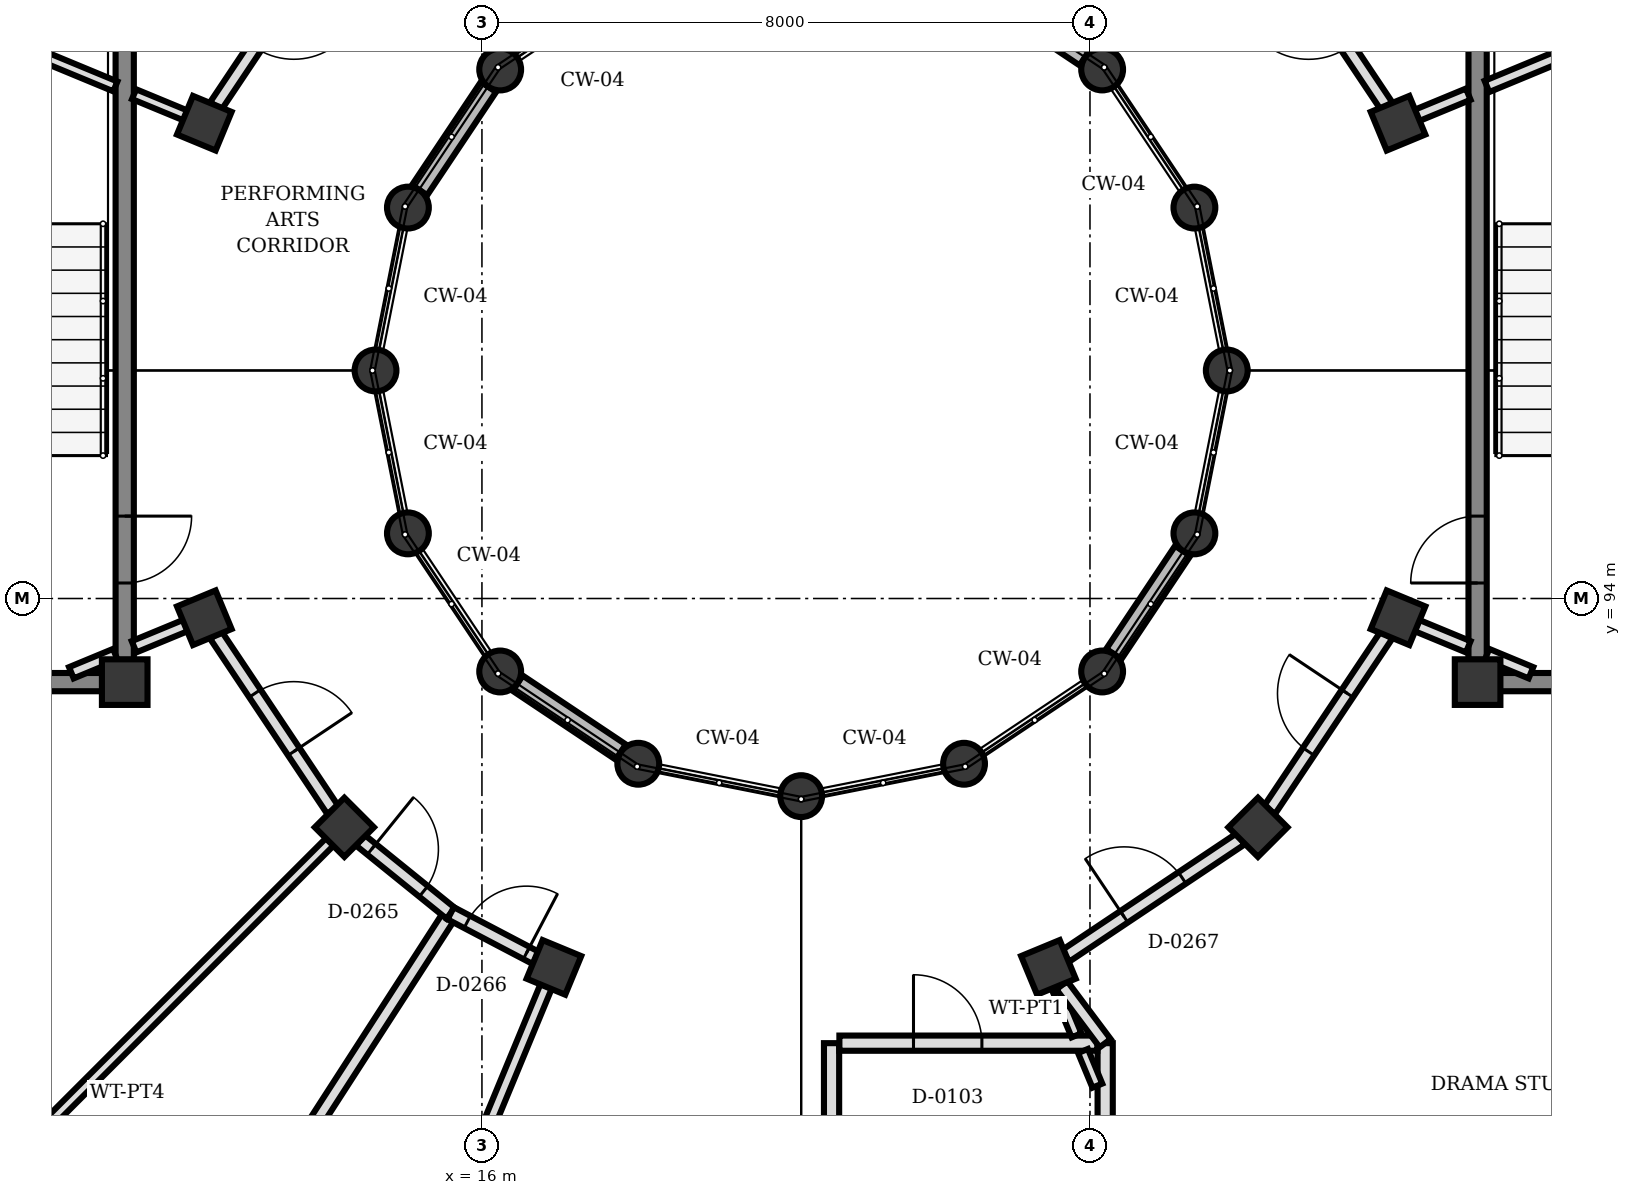
"""IFC4 building model, lengths in metres.
Left out: names, types, materials, properties, quantities, classifications, styles, units other than length and angle.
Written with IfcOpenShell. Run it as: python <this file> out.ifc"""

import sys

from ifc_helpers import new_model, si_unit, direction, frame, frame_2d, origin, origin_2d, place, context, subcontext, project, spatial, rectangle, circle, extrude, element, fill, save


model = new_model("IFC4")
c1 = context("Model", 3, precision=1e-05, world=origin(), true_north=direction((0.0, 1.0)))
c2 = subcontext(c1, "Body", "Model", "MODEL_VIEW")
j1 = project(units=[si_unit("LENGTHUNIT", "METRE"), si_unit("PLANEANGLEUNIT", "RADIAN")], contexts=[c1])
p1 = place(None, origin())
s1 = spatial("IfcSite", under=j1, at=p1, CompositionType="ELEMENT")
p2 = place(p1, origin())
s2 = spatial("IfcBuilding", under=s1, at=p2, CompositionType="ELEMENT")
p3 = place(p2, frame((0.0, 0.0, 8.5)))
s3 = spatial("IfcBuildingStorey", under=s2, at=p3, CompositionType="ELEMENT", Elevation=8.5)
for number, where, z_axis, x_axis in (
    (1, (11.3, 92.9, 0.0), (0.0, 0.0, 1.0), (1.0, 0.0, 0.0)),
    (2, (29.1, 92.9, 0.0), (0.0, 0.0, 1.0), (1.0, 0.0, 0.0)),
):
    element("IfcColumn", number, at=place(p3, frame(where, z_axis=z_axis, x_axis=x_axis)), inside=s3, PredefinedType="COLUMN", context=c2, shape_type="SweptSolid", body=[
        extrude(rectangle(XDim=0.6, YDim=0.6, at=origin_2d()), origin(), (0.0, 0.0, 1.0), 4.0),
    ])
for number, where, z_axis, x_axis in (
    (3, (25.8, 97.0, 0.0), (0.0, 0.0, 1.0), (1.0, 0.0, 0.0)),
    (4, (25.374, 99.143, 0.0), (0.0, 0.0, 1.0), (1.0, 0.0, 0.0)),
    (5, (24.16, 100.96, 0.0), (0.0, 0.0, 1.0), (1.0, 0.0, 0.0)),
    (6, (16.24, 100.96, 0.0), (0.0, 0.0, 1.0), (1.0, 0.0, 0.0)),
    (7, (15.026, 99.143, 0.0), (0.0, 0.0, 1.0), (1.0, 0.0, 0.0)),
    (8, (14.6, 97.0, 0.0), (0.0, 0.0, 1.0), (1.0, 0.0, 0.0)),
    (9, (15.026, 94.857, 0.0), (0.0, 0.0, 1.0), (1.0, 0.0, 0.0)),
    (10, (16.24, 93.04, 0.0), (0.0, 0.0, 1.0), (1.0, 0.0, 0.0)),
    (11, (18.057, 91.826, 0.0), (0.0, 0.0, 1.0), (1.0, 0.0, 0.0)),
    (12, (20.2, 91.4, 0.0), (0.0, 0.0, 1.0), (1.0, 0.0, 0.0)),
    (13, (22.343, 91.826, 0.0), (0.0, 0.0, 1.0), (1.0, 0.0, 0.0)),
    (14, (24.16, 93.04, 0.0), (0.0, 0.0, 1.0), (1.0, 0.0, 0.0)),
    (15, (25.374, 94.857, 0.0), (0.0, 0.0, 1.0), (1.0, 0.0, 0.0)),
):
    element("IfcColumn", number, at=place(p3, frame(where, z_axis=z_axis, x_axis=x_axis)), inside=s3, PredefinedType="COLUMN", context=c2, shape_type="SweptSolid", body=[
        extrude(circle(Radius=0.275, at=origin_2d()), origin(), (0.0, 0.0, 1.0), 4.0),
    ])
for number, where, z_axis, x_axis in (
    (16, (28.053, 100.253, 0.0), (0.0, 0.0, 1.0), (0.924, 0.383, 0.0)),
    (17, (12.347, 100.253, 0.0), (0.0, 0.0, 1.0), (-0.924, 0.383, 0.0)),
    (18, (12.347, 93.747, 0.0), (0.0, 0.0, 1.0), (-0.924, -0.383, 0.0)),
    (19, (14.19, 90.99, 0.0), (0.0, 0.0, 1.0), (-0.707, -0.707, 0.0)),
    (20, (16.947, 89.147, 0.0), (0.0, 0.0, 1.0), (-0.383, -0.924, 0.0)),
    (21, (23.453, 89.147, 0.0), (0.0, 0.0, 1.0), (0.383, -0.924, 0.0)),
    (22, (26.21, 90.99, 0.0), (0.0, 0.0, 1.0), (0.707, -0.707, 0.0)),
    (23, (28.053, 93.747, 0.0), (0.0, 0.0, 1.0), (0.924, -0.383, 0.0)),
):
    element("IfcColumn", number, at=place(p3, frame(where, z_axis=z_axis, x_axis=x_axis)), inside=s3, PredefinedType="COLUMN", context=c2, shape_type="SweptSolid", body=[
        extrude(rectangle(XDim=0.55, YDim=0.55, at=origin_2d()), origin(), (0.0, 0.0, 1.0), 4.0),
    ])
for number, where, z_axis, x_axis in (
    (24, (23.93, 101.114, 0.0), (0.0, 0.0, 1.0), (-0.832, 0.555, 0.0)),
    (25, (16.086, 100.73, 0.0), (0.0, 0.0, 1.0), (-0.555, -0.832, 0.0)),
    (26, (16.47, 92.886, 0.0), (0.0, 0.0, 1.0), (0.832, -0.555, 0.0)),
    (27, (24.314, 93.27, 0.0), (0.0, 0.0, 1.0), (0.555, 0.832, 0.0)),
):
    element("IfcWall", number, at=place(p3, frame(where, z_axis=z_axis, x_axis=x_axis)), inside=s3, PredefinedType="SOLIDWALL", context=c2, shape_type="SweptSolid", body=[
        extrude(rectangle(XDim=1.632, YDim=0.24, at=frame_2d((0.816, 0.0))), origin(), (0.0, 0.0, 1.0), 3.222),
    ])
p4 = place(p3, frame((11.3, 101.328, 0.0), z_axis=(0.0, 0.0, 1.0), x_axis=(0.0, -1.0, 0.0)))
e28 = element("IfcWall", 28, at=p4, inside=s3, PredefinedType="SHEAR", context=c2, shape_type="SweptSolid", body=[
    extrude(rectangle(XDim=8.136, YDim=0.24, at=frame_2d((4.068, 0.0))), origin(), (0.0, 0.0, 1.0), 3.74),
])
p5 = place(p4, frame((6.244, 0.0, 0.0)))
e29 = element("IfcOpeningElement", 29, at=p5, cuts=e28, PredefinedType="OPENING", context=c2, shape_type="SweptSolid", body=[
    extrude(rectangle(XDim=0.88, YDim=2.1, at=frame_2d((0.44, 1.05))), frame((0.0, 0.13, 0.0), z_axis=(0.0, -1.0, 0.0), x_axis=(1.0, 0.0, 0.0)), (0.0, 0.0, 1.0), 0.26),
])
p6 = place(p3, frame((11.008, 92.9, 0.0), z_axis=(0.0, 0.0, 1.0), x_axis=(-1.0, 0.0, 0.0)))
e30 = element("IfcWall", 30, at=p6, inside=s3, PredefinedType="SHEAR", context=c2, shape_type="SweptSolid", body=[
    extrude(rectangle(XDim=4.216, YDim=0.24, at=frame_2d((2.108, 0.0))), origin(), (0.0, 0.0, 1.0), 3.74),
])
p7 = place(p3, frame((29.1, 93.192, 0.0), z_axis=(0.0, 0.0, 1.0), x_axis=(0.0, 1.0, 0.0)))
e31 = element("IfcWall", 31, at=p7, inside=s3, PredefinedType="SHEAR", context=c2, shape_type="SweptSolid", body=[
    extrude(rectangle(XDim=8.136, YDim=0.24, at=frame_2d((4.068, 0.0))), origin(), (0.0, 0.0, 1.0), 3.74),
])
p8 = place(p7, frame((1.012, 0.0, 0.0)))
e32 = element("IfcOpeningElement", 32, at=p8, cuts=e31, PredefinedType="OPENING", context=c2, shape_type="SweptSolid", body=[
    extrude(rectangle(XDim=0.88, YDim=2.1, at=frame_2d((0.44, 1.05))), frame((0.0, 0.13, 0.0), z_axis=(0.0, -1.0, 0.0), x_axis=(1.0, 0.0, 0.0)), (0.0, 0.0, 1.0), 0.26),
])
p9 = place(p3, frame((33.608, 92.9, 0.0), z_axis=(0.0, 0.0, 1.0), x_axis=(-1.0, 0.0, 0.0)))
e33 = element("IfcWall", 33, at=p9, inside=s3, PredefinedType="SHEAR", context=c2, shape_type="SweptSolid", body=[
    extrude(rectangle(XDim=4.216, YDim=0.24, at=frame_2d((2.108, 0.0))), origin(), (0.0, 0.0, 1.0), 3.74),
])
p10 = place(p3, frame((20.6, 84.867, 0.0), z_axis=(0.0, 0.0, 1.0), x_axis=(0.0, 1.0, 0.0)))
e34 = element("IfcWall", 34, at=p10, inside=s3, PredefinedType="PARTITIONING", context=c2, shape_type="SweptSolid", body=[
    extrude(rectangle(XDim=3.283, YDim=0.2, at=frame_2d((1.642, 0.0))), origin(), (0.0, 0.0, 1.0), 3.7),
])
p11 = place(p3, frame((24.2, 84.703, 0.0), z_axis=(0.0, 0.0, 1.0), x_axis=(0.0, 1.0, 0.0)))
e35 = element("IfcWall", 35, at=p11, inside=s3, PredefinedType="PARTITIONING", context=c2, shape_type="SweptSolid", body=[
    extrude(rectangle(XDim=3.447, YDim=0.2, at=frame_2d((1.724, 0.0))), origin(), (0.0, 0.0, 1.0), 3.072),
])
p12 = place(p3, frame((20.703, 88.15, 0.0), z_axis=(0.0, 0.0, 1.0), x_axis=(1.0, 0.0, 0.0)))
e36 = element("IfcWall", 36, at=p12, inside=s3, PredefinedType="PARTITIONING", context=c2, shape_type="SweptSolid", body=[
    extrude(rectangle(XDim=3.394, YDim=0.2, at=frame_2d((1.697, 0.0))), origin(), (0.0, 0.0, 1.0), 3.072),
])
p13 = place(p12, frame((0.975, 0.0, 0.0)))
e37 = element("IfcOpeningElement", 37, at=p13, cuts=e36, PredefinedType="OPENING", context=c2, shape_type="SweptSolid", body=[
    extrude(rectangle(XDim=0.9, YDim=2.2, at=frame_2d((0.45, 1.1))), frame((0.0, 0.11, 0.0), z_axis=(0.0, -1.0, 0.0), x_axis=(1.0, 0.0, 0.0)), (0.0, 0.0, 1.0), 0.22),
])
p14 = place(p3, frame((28.3, 100.355, 0.0), z_axis=(0.0, 0.0, 1.0), x_axis=(0.924069600435, 0.382224245113, 0.0)))
e38 = element("IfcWall", 38, at=p14, inside=s3, PredefinedType="PARTITIONING", context=c2, shape_type="SweptSolid", body=[
    extrude(rectangle(XDim=0.733, YDim=0.16, at=frame_2d((0.366, 0.0))), origin(), (0.0, 0.0, 1.0), 3.7),
])
p15 = place(p3, frame((29.223, 100.737, 0.0), z_axis=(0.0, 0.0, 1.0), x_axis=(0.923817443679, 0.382833293686, 0.0)))
e39 = element("IfcWall", 39, at=p15, inside=s3, PredefinedType="PARTITIONING", context=c2, shape_type="SweptSolid", body=[
    extrude(rectangle(XDim=1.985, YDim=0.16, at=frame_2d((0.993, 0.0))), origin(), (0.0, 0.0, 1.0), 3.7),
])
p16 = place(p3, frame((12.1, 100.355, 0.0), z_axis=(0.0, 0.0, 1.0), x_axis=(-0.924069600435, 0.382224245113, 0.0)))
e40 = element("IfcWall", 40, at=p16, inside=s3, PredefinedType="PARTITIONING", context=c2, shape_type="SweptSolid", body=[
    extrude(rectangle(XDim=0.733, YDim=0.14, at=frame_2d((0.366, 0.0))), origin(), (0.0, 0.0, 1.0), 3.7),
])
p17 = place(p3, frame((11.177, 100.737, 0.0), z_axis=(0.0, 0.0, 1.0), x_axis=(-0.923817443679, 0.382833293686, 0.0)))
e41 = element("IfcWall", 41, at=p17, inside=s3, PredefinedType="PARTITIONING", context=c2, shape_type="SweptSolid", body=[
    extrude(rectangle(XDim=1.985, YDim=0.14, at=frame_2d((0.993, 0.0))), origin(), (0.0, 0.0, 1.0), 3.7),
])
p18 = place(p3, frame((12.1, 93.645, 0.0), z_axis=(0.0, 0.0, 1.0), x_axis=(-0.924069600435, -0.382224245113, 0.0)))
e42 = element("IfcWall", 42, at=p18, inside=s3, PredefinedType="PARTITIONING", context=c2, shape_type="SweptSolid", body=[
    extrude(rectangle(XDim=0.733, YDim=0.16, at=frame_2d((0.366, 0.0))), origin(), (0.0, 0.0, 1.0), 3.072),
])
p19 = place(p3, frame((11.177, 93.263, 0.0), z_axis=(0.0, 0.0, 1.0), x_axis=(-0.923812676193, -0.382844797933, 0.0)))
e43 = element("IfcWall", 43, at=p19, inside=s3, PredefinedType="PARTITIONING", context=c2, shape_type="SweptSolid", body=[
    extrude(rectangle(XDim=0.627, YDim=0.16, at=frame_2d((0.313, 0.0))), origin(), (0.0, 0.0, 1.0), 3.072),
])
p20 = place(p3, frame((14.001, 90.801, 0.0), z_axis=(0.0, 0.0, 1.0), x_axis=(-0.707106781187, -0.707106781187, 0.0)))
e44 = element("IfcWall", 44, at=p20, inside=s3, PredefinedType="PARTITIONING", context=c2, shape_type="SweptSolid", body=[
    extrude(rectangle(XDim=8.441, YDim=0.14, at=frame_2d((4.221, 0.0))), origin(), (0.0, 0.0, 1.0), 3.072),
])
p21 = place(p3, frame((16.845, 88.9, 0.0), z_axis=(0.0, 0.0, 1.0), x_axis=(-0.382683896966, -0.923879340067, 0.0)))
e45 = element("IfcWall", 45, at=p21, inside=s3, PredefinedType="PARTITIONING", context=c2, shape_type="SweptSolid", body=[
    extrude(rectangle(XDim=8.44, YDim=0.16, at=frame_2d((4.22, 0.0))), origin(), (0.0, 0.0, 1.0), 3.072),
])
p22 = place(p3, frame((23.555, 88.9, 0.0), z_axis=(0.0, 0.0, 1.0), x_axis=(0.38278283439, -0.923838352579, 0.0)))
e46 = element("IfcWall", 46, at=p22, inside=s3, PredefinedType="PARTITIONING", context=c2, shape_type="SweptSolid", body=[
    extrude(rectangle(XDim=0.7, YDim=0.14, at=frame_2d((0.35, 0.0))), origin(), (0.0, 0.0, 1.0), 3.072),
])
p23 = place(p3, frame((23.908, 88.047, 0.0), z_axis=(0.0, 0.0, 1.0), x_axis=(0.3827885685, -0.92383597669, 0.0)))
e47 = element("IfcWall", 47, at=p23, inside=s3, PredefinedType="PARTITIONING", context=c2, shape_type="SweptSolid", body=[
    extrude(rectangle(XDim=0.494, YDim=0.14, at=frame_2d((0.247, 0.0))), origin(), (0.0, 0.0, 1.0), 3.072),
])
p24 = place(p3, frame((28.3, 93.645, 0.0), z_axis=(0.0, 0.0, 1.0), x_axis=(0.924069600435, -0.382224245113, 0.0)))
e48 = element("IfcWall", 48, at=p24, inside=s3, PredefinedType="PARTITIONING", context=c2, shape_type="SweptSolid", body=[
    extrude(rectangle(XDim=0.733, YDim=0.16, at=frame_2d((0.366, 0.0))), origin(), (0.0, 0.0, 1.0), 3.072),
])
p25 = place(p3, frame((29.223, 93.263, 0.0), z_axis=(0.0, 0.0, 1.0), x_axis=(0.923812676193, -0.382844797933, 0.0)))
e49 = element("IfcWall", 49, at=p25, inside=s3, PredefinedType="PARTITIONING", context=c2, shape_type="SweptSolid", body=[
    extrude(rectangle(XDim=0.627, YDim=0.16, at=frame_2d((0.313, 0.0))), origin(), (0.0, 0.0, 1.0), 3.072),
])
p26 = place(p3, frame((15.589, 89.859, 0.0), z_axis=(0.0, 0.0, 1.0), x_axis=(-0.542440235144, -0.840094394278, 0.0)))
e50 = element("IfcWall", 50, at=p26, inside=s3, PredefinedType="PARTITIONING", context=c2, shape_type="SweptSolid", body=[
    extrude(rectangle(XDim=8.552, YDim=0.18, at=frame_2d((4.276, 0.0))), origin(), (0.0, 0.0, 1.0), 3.072),
])
p27 = place(p3, frame((27.902, 100.479, 0.0), z_axis=(0.0, 0.0, 1.0), x_axis=(-0.555797002478, 0.831318045056, 0.0)))
e51 = element("IfcWall", 51, at=p27, inside=s3, PredefinedType="PARTITIONING", context=c2, shape_type="SweptSolid", body=[
    extrude(rectangle(XDim=2.773, YDim=0.18, at=frame_2d((1.386, 0.0))), origin(), (0.0, 0.0, 1.0), 3.072),
])
p28 = place(p27, frame((0.926, 0.0, 0.0)))
e52 = element("IfcOpeningElement", 52, at=p28, cuts=e51, PredefinedType="OPENING", context=c2, shape_type="SweptSolid", body=[
    extrude(rectangle(XDim=0.92, YDim=2.1, at=frame_2d((0.46, 1.05))), frame((0.0, 0.1, 0.0), z_axis=(0.0, -1.0, 0.0), x_axis=(1.0, 0.0, 0.0)), (0.0, 0.0, 1.0), 0.2),
])
p29 = place(p3, frame((14.039, 102.784, 0.0), z_axis=(0.0, 0.0, 1.0), x_axis=(-0.555797002478, -0.831318045056, 0.0)))
e53 = element("IfcWall", 53, at=p29, inside=s3, PredefinedType="PARTITIONING", context=c2, shape_type="SweptSolid", body=[
    extrude(rectangle(XDim=2.773, YDim=0.18, at=frame_2d((1.386, 0.0))), origin(), (0.0, 0.0, 1.0), 3.072),
])
p30 = place(p29, frame((0.926, 0.0, 0.0)))
e54 = element("IfcOpeningElement", 54, at=p30, cuts=e53, PredefinedType="OPENING", context=c2, shape_type="SweptSolid", body=[
    extrude(rectangle(XDim=0.92, YDim=2.1, at=frame_2d((0.46, 1.05))), frame((0.0, 0.1, 0.0), z_axis=(0.0, -1.0, 0.0), x_axis=(1.0, 0.0, 0.0)), (0.0, 0.0, 1.0), 0.2),
])
p31 = place(p3, frame((12.498, 93.521, 0.0), z_axis=(0.0, 0.0, 1.0), x_axis=(0.555797002478, -0.831318045056, 0.0)))
e55 = element("IfcWall", 55, at=p31, inside=s3, PredefinedType="PARTITIONING", context=c2, shape_type="SweptSolid", body=[
    extrude(rectangle(XDim=2.773, YDim=0.18, at=frame_2d((1.386, 0.0))), origin(), (0.0, 0.0, 1.0), 3.072),
])
p32 = place(p31, frame((0.926, 0.0, 0.0)))
e56 = element("IfcOpeningElement", 56, at=p32, cuts=e55, PredefinedType="OPENING", context=c2, shape_type="SweptSolid", body=[
    extrude(rectangle(XDim=0.92, YDim=2.1, at=frame_2d((0.46, 1.05))), frame((0.0, 0.1, 0.0), z_axis=(0.0, -1.0, 0.0), x_axis=(1.0, 0.0, 0.0)), (0.0, 0.0, 1.0), 0.2),
])
p33 = place(p3, frame((14.399, 90.821, 0.0), z_axis=(0.0, 0.0, 1.0), x_axis=(0.777668191933, -0.628674942443, 0.0)))
e57 = element("IfcWall", 57, at=p33, inside=s3, PredefinedType="PARTITIONING", context=c2, shape_type="SweptSolid", body=[
    extrude(rectangle(XDim=1.531, YDim=0.18, at=frame_2d((0.765, 0.0))), origin(), (0.0, 0.0, 1.0), 3.072),
])
p34 = place(p33, frame((0.191, 0.0, 0.0)))
e58 = element("IfcOpeningElement", 58, at=p34, cuts=e57, PredefinedType="OPENING", context=c2, shape_type="SweptSolid", body=[
    extrude(rectangle(XDim=0.88, YDim=2.1, at=frame_2d((0.44, 1.05))), frame((0.0, 0.1, 0.0), z_axis=(0.0, -1.0, 0.0), x_axis=(1.0, 0.0, 0.0)), (0.0, 0.0, 1.0), 0.2),
])
p35 = place(p3, frame((15.589, 89.859, 0.0), z_axis=(0.0, 0.0, 1.0), x_axis=(0.88557844419, -0.464489848314, 0.0)))
e59 = element("IfcWall", 59, at=p35, inside=s3, PredefinedType="PARTITIONING", context=c2, shape_type="SweptSolid", body=[
    extrude(rectangle(XDim=1.266, YDim=0.18, at=frame_2d((0.633, 0.0))), origin(), (0.0, 0.0, 1.0), 3.072),
])
p36 = place(p35, frame((0.246, 0.0, 0.0)))
e60 = element("IfcOpeningElement", 60, at=p36, cuts=e59, PredefinedType="OPENING", context=c2, shape_type="SweptSolid", body=[
    extrude(rectangle(XDim=0.88, YDim=2.1, at=frame_2d((0.44, 1.05))), frame((0.0, 0.1, 0.0), z_axis=(0.0, -1.0, 0.0), x_axis=(1.0, 0.0, 0.0)), (0.0, 0.0, 1.0), 0.2),
])
p37 = place(p3, frame((23.679, 89.298, 0.0), z_axis=(0.0, 0.0, 1.0), x_axis=(0.831318045056, 0.555797002478, 0.0)))
e61 = element("IfcWall", 61, at=p37, inside=s3, PredefinedType="PARTITIONING", context=c2, shape_type="SweptSolid", body=[
    extrude(rectangle(XDim=2.773, YDim=0.18, at=frame_2d((1.386, 0.0))), origin(), (0.0, 0.0, 1.0), 3.072),
])
p38 = place(p37, frame((0.926, 0.0, 0.0)))
e62 = element("IfcOpeningElement", 62, at=p38, cuts=e61, PredefinedType="OPENING", context=c2, shape_type="SweptSolid", body=[
    extrude(rectangle(XDim=0.92, YDim=2.1, at=frame_2d((0.46, 1.05))), frame((0.0, 0.1, 0.0), z_axis=(0.0, -1.0, 0.0), x_axis=(1.0, 0.0, 0.0)), (0.0, 0.0, 1.0), 0.2),
])
p39 = place(p3, frame((26.361, 91.216, 0.0), z_axis=(0.0, 0.0, 1.0), x_axis=(0.555797002478, 0.831318045056, 0.0)))
e63 = element("IfcWall", 63, at=p39, inside=s3, PredefinedType="PARTITIONING", context=c2, shape_type="SweptSolid", body=[
    extrude(rectangle(XDim=2.773, YDim=0.18, at=frame_2d((1.386, 0.0))), origin(), (0.0, 0.0, 1.0), 3.072),
])
p40 = place(p39, frame((0.926, 0.0, 0.0)))
e64 = element("IfcOpeningElement", 64, at=p40, cuts=e63, PredefinedType="OPENING", context=c2, shape_type="SweptSolid", body=[
    extrude(rectangle(XDim=0.92, YDim=2.1, at=frame_2d((0.46, 1.05))), frame((0.0, 0.1, 0.0), z_axis=(0.0, -1.0, 0.0), x_axis=(1.0, 0.0, 0.0)), (0.0, 0.0, 1.0), 0.2),
])
p41 = place(p3, frame((24.2, 88.15, 0.0), z_axis=(0.0, 0.0, 1.0), x_axis=(-0.599589769956, 0.800307508252, 0.0)))
e65 = element("IfcWall", 65, at=p41, inside=s3, PredefinedType="PARTITIONING", context=c2, shape_type="SweptSolid", body=[
    extrude(rectangle(XDim=0.952, YDim=0.18, at=frame_2d((0.476, 0.0))), origin(), (0.0, 0.0, 1.0), 3.072),
])
p42 = place(p5, origin())
e66 = element("IfcDoor", 66, at=p42, inside=s3, OperationType="SINGLE_SWING_LEFT", PredefinedType="DOOR", context=c2, shape_type="SweptSolid", body=[
    extrude(rectangle(XDim=0.88, YDim=2.1, at=frame_2d((0.44, 1.05))), frame((0.0, 0.025, 0.0), z_axis=(0.0, -1.0, 0.0), x_axis=(1.0, 0.0, 0.0)), (0.0, 0.0, 1.0), 0.05),
])
fill(e29, e66)
p43 = place(p8, origin())
e67 = element("IfcDoor", 67, at=p43, inside=s3, OperationType="SINGLE_SWING_LEFT", PredefinedType="DOOR", context=c2, shape_type="SweptSolid", body=[
    extrude(rectangle(XDim=0.88, YDim=2.1, at=frame_2d((0.44, 1.05))), frame((0.0, 0.025, 0.0), z_axis=(0.0, -1.0, 0.0), x_axis=(1.0, 0.0, 0.0)), (0.0, 0.0, 1.0), 0.05),
])
fill(e32, e67)
p44 = place(p13, origin())
e68 = element("IfcDoor", 68, at=p44, inside=s3, OperationType="SINGLE_SWING_LEFT", PredefinedType="DOOR", context=c2, shape_type="SweptSolid", body=[
    extrude(rectangle(XDim=0.9, YDim=2.2, at=frame_2d((0.45, 1.1))), frame((0.0, 0.025, 0.0), z_axis=(0.0, -1.0, 0.0), x_axis=(1.0, 0.0, 0.0)), (0.0, 0.0, 1.0), 0.05),
])
fill(e37, e68)
p45 = place(p32, origin())
e69 = element("IfcDoor", 69, at=p45, inside=s3, OperationType="SINGLE_SWING_RIGHT", PredefinedType="DOOR", context=c2, shape_type="SweptSolid", body=[
    extrude(rectangle(XDim=0.92, YDim=2.1, at=frame_2d((0.46, 1.05))), frame((0.0, 0.025, 0.0), z_axis=(0.0, -1.0, 0.0), x_axis=(1.0, 0.0, 0.0)), (0.0, 0.0, 1.0), 0.05),
])
fill(e56, e69)
p46 = place(p34, origin())
e70 = element("IfcDoor", 70, at=p46, inside=s3, OperationType="SINGLE_SWING_LEFT", PredefinedType="DOOR", context=c2, shape_type="SweptSolid", body=[
    extrude(rectangle(XDim=0.88, YDim=2.1, at=frame_2d((0.44, 1.05))), frame((0.0, 0.025, 0.0), z_axis=(0.0, -1.0, 0.0), x_axis=(1.0, 0.0, 0.0)), (0.0, 0.0, 1.0), 0.05),
])
fill(e58, e70)
p47 = place(p36, origin())
e71 = element("IfcDoor", 71, at=p47, inside=s3, OperationType="SINGLE_SWING_RIGHT", PredefinedType="DOOR", context=c2, shape_type="SweptSolid", body=[
    extrude(rectangle(XDim=0.88, YDim=2.1, at=frame_2d((0.44, 1.05))), frame((0.0, 0.025, 0.0), z_axis=(0.0, -1.0, 0.0), x_axis=(1.0, 0.0, 0.0)), (0.0, 0.0, 1.0), 0.05),
])
fill(e60, e71)
p48 = place(p38, origin())
e72 = element("IfcDoor", 72, at=p48, inside=s3, OperationType="SINGLE_SWING_LEFT", PredefinedType="DOOR", context=c2, shape_type="SweptSolid", body=[
    extrude(rectangle(XDim=0.92, YDim=2.1, at=frame_2d((0.46, 1.05))), frame((0.0, 0.025, 0.0), z_axis=(0.0, -1.0, 0.0), x_axis=(1.0, 0.0, 0.0)), (0.0, 0.0, 1.0), 0.05),
])
fill(e62, e72)
p49 = place(p40, origin())
e73 = element("IfcDoor", 73, at=p49, inside=s3, OperationType="SINGLE_SWING_RIGHT", PredefinedType="DOOR", context=c2, shape_type="SweptSolid", body=[
    extrude(rectangle(XDim=0.92, YDim=2.1, at=frame_2d((0.46, 1.05))), frame((0.0, 0.025, 0.0), z_axis=(0.0, -1.0, 0.0), x_axis=(1.0, 0.0, 0.0)), (0.0, 0.0, 1.0), 0.05),
])
fill(e64, e73)
save(model, sys.argv[1])
